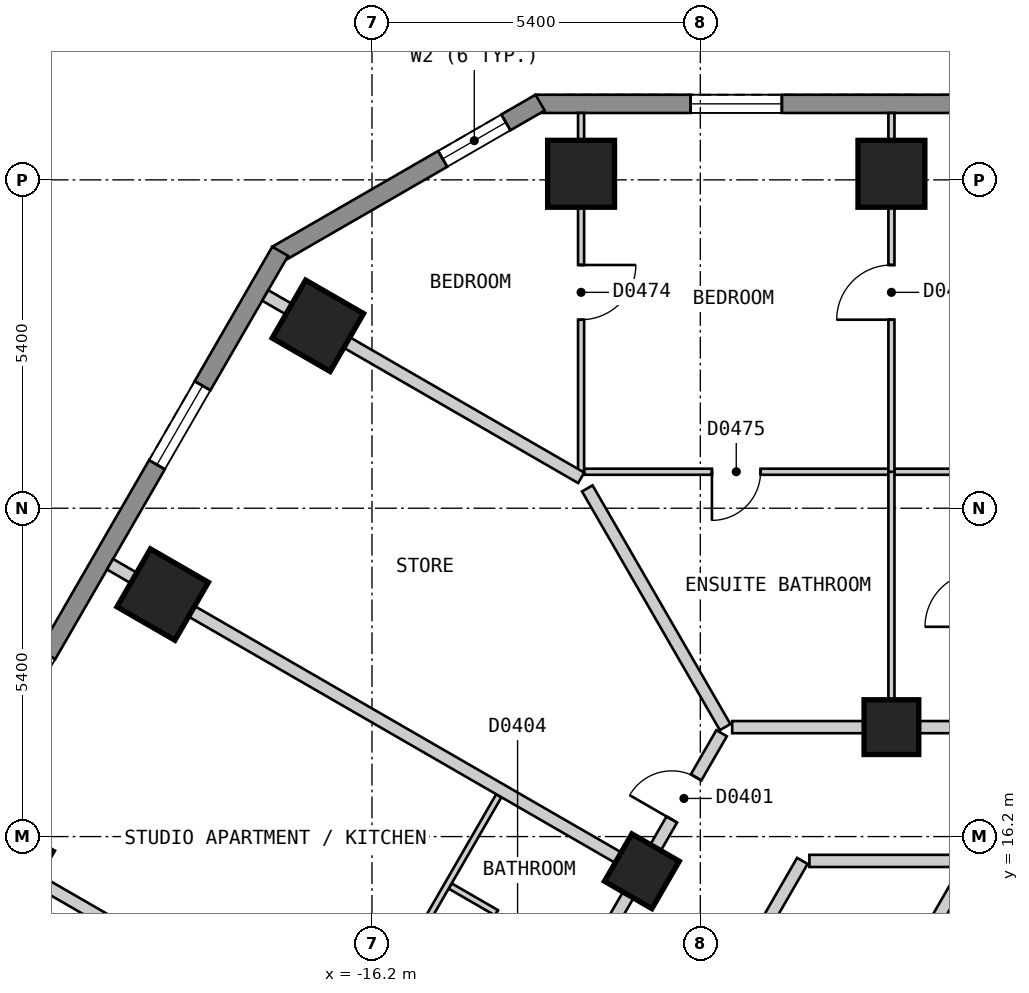
"""IFC4 building model, lengths in metres.
Left out: names, types, materials, properties, quantities, classifications, styles, units other than length and angle.
Written with IfcOpenShell. Run it as: python <this file> out.ifc"""

import sys

from ifc_helpers import new_model, si_unit, direction, frame, frame_2d, origin, origin_2d, place, context, subcontext, project, spatial, polyline, rectangle, outline, extrude, element, fill, save


model = new_model("IFC4")
c1 = context("Model", 3, precision=1e-05, world=origin(), true_north=direction((0.0, 1.0)))
c2 = subcontext(c1, "Body", "Model", "MODEL_VIEW")
j1 = project(units=[si_unit("LENGTHUNIT", "METRE"), si_unit("PLANEANGLEUNIT", "RADIAN")], contexts=[c1])
p1 = place(None, origin())
s1 = spatial("IfcSite", under=j1, at=p1, CompositionType="ELEMENT")
p2 = place(p1, origin())
s2 = spatial("IfcBuilding", under=s1, at=p2, CompositionType="ELEMENT")
p3 = place(p2, frame((0.0, 0.0, 26.4)))
s3 = spatial("IfcBuildingStorey", under=s2, at=p3, CompositionType="ELEMENT", Elevation=26.4)
for number, where, z_axis, x_axis in (
    (1, (-7.657, 27.1, 0.0), (0.0, 0.0, 1.0), (-1.0, 0.0, 0.0)),
    (2, (-12.761, 27.1, 0.0), (0.0, 0.0, 1.0), (-1.0, 0.0, 0.0)),
    (3, (-17.09, 24.6, 0.0), (0.0, 0.0, 1.0), (-0.5, -0.866, 0.0)),
    (4, (-19.642, 20.18, 0.0), (0.0, 0.0, 1.0), (-0.5, -0.866, 0.0)),
    (5, (-22.194, 15.759, 0.0), (0.0, 0.0, 1.0), (-0.5, -0.866, 0.0)),
):
    element("IfcColumn", number, at=place(p3, frame(where, z_axis=z_axis, x_axis=x_axis)), inside=s3, PredefinedType="COLUMN", context=c2, shape_type="SweptSolid", body=[
        extrude(rectangle(XDim=1.1, YDim=1.1, at=origin_2d()), origin(), (0.0, 0.0, 1.0), 3.0),
    ])
for number, where, z_axis, x_axis in (
    (6, (-7.657, 18.0, 0.0), (0.0, 0.0, 1.0), (-1.0, 0.0, 0.0)),
    (7, (-11.761, 15.63, 0.0), (0.0, 0.0, 1.0), (-0.5, -0.866, 0.0)),
):
    element("IfcColumn", number, at=place(p3, frame(where, z_axis=z_axis, x_axis=x_axis)), inside=s3, PredefinedType="COLUMN", context=c2, shape_type="SweptSolid", body=[
        extrude(rectangle(XDim=0.9, YDim=0.9, at=origin_2d()), origin(), (0.0, 0.0, 1.0), 3.0),
    ])
p4 = place(p3, frame((13.51, 28.25, 0.0), z_axis=(0.0, 0.0, 1.0), x_axis=(-1.0, 0.0, 0.0)))
e8 = element("IfcWall", 8, at=p4, inside=s3, PredefinedType="SOLIDWALL", context=c2, shape_type="SweptSolid", body=[
    extrude(outline(polyline([(0.0, -0.15), (27.02, -0.15), (26.94, 0.15), (0.08, 0.15), (0.0, -0.15)])), origin(), (0.0, 0.0, 1.0), 2.7),
])
p5 = place(p4, frame((2.553, 0.0, 0.15)))
e9 = element("IfcOpeningElement", 9, at=p5, cuts=e8, PredefinedType="OPENING", context=c2, shape_type="SweptSolid", body=[
    extrude(rectangle(XDim=1.5, YDim=2.1, at=frame_2d((0.75, 1.05))), frame((0.0, 0.16, 0.0), z_axis=(0.0, -1.0, 0.0), x_axis=(1.0, 0.0, 0.0)), (0.0, 0.0, 1.0), 0.32),
])
p6 = place(p4, frame((7.657, 0.0, 0.15)))
e10 = element("IfcOpeningElement", 10, at=p6, cuts=e8, PredefinedType="OPENING", context=c2, shape_type="SweptSolid", body=[
    extrude(rectangle(XDim=1.5, YDim=2.1, at=frame_2d((0.75, 1.05))), frame((0.0, 0.16, 0.0), z_axis=(0.0, -1.0, 0.0), x_axis=(1.0, 0.0, 0.0)), (0.0, 0.0, 1.0), 0.32),
])
p7 = place(p4, frame((12.761, 0.0, 0.15)))
e11 = element("IfcOpeningElement", 11, at=p7, cuts=e8, PredefinedType="OPENING", context=c2, shape_type="SweptSolid", body=[
    extrude(rectangle(XDim=1.5, YDim=2.1, at=frame_2d((0.75, 1.05))), frame((0.0, 0.16, 0.0), z_axis=(0.0, -1.0, 0.0), x_axis=(1.0, 0.0, 0.0)), (0.0, 0.0, 1.0), 0.32),
])
p8 = place(p4, frame((17.865, 0.0, 0.15)))
e12 = element("IfcOpeningElement", 12, at=p8, cuts=e8, PredefinedType="OPENING", context=c2, shape_type="SweptSolid", body=[
    extrude(rectangle(XDim=1.5, YDim=2.1, at=frame_2d((0.75, 1.05))), frame((0.0, 0.16, 0.0), z_axis=(0.0, -1.0, 0.0), x_axis=(1.0, 0.0, 0.0)), (0.0, 0.0, 1.0), 0.32),
])
p9 = place(p4, frame((22.969, 0.0, 0.15)))
e13 = element("IfcOpeningElement", 13, at=p9, cuts=e8, PredefinedType="OPENING", context=c2, shape_type="SweptSolid", body=[
    extrude(rectangle(XDim=1.5, YDim=2.1, at=frame_2d((0.75, 1.05))), frame((0.0, 0.16, 0.0), z_axis=(0.0, -1.0, 0.0), x_axis=(1.0, 0.0, 0.0)), (0.0, 0.0, 1.0), 0.32),
])
p10 = place(p3, frame((-13.435, 28.27, 0.0), z_axis=(0.0, 0.0, 1.0), x_axis=(-0.866010750942, -0.50002537861, 0.0)))
e14 = element("IfcWall", 14, at=p10, inside=s3, PredefinedType="SOLIDWALL", context=c2, shape_type="SweptSolid", body=[
    extrude(outline(polyline([(0.0, -0.15), (5.0, -0.15), (4.919, 0.15), (0.08, 0.15), (0.0, -0.15)])), origin(), (0.0, 0.0, 1.0), 2.7),
])
p11 = place(p10, frame((0.65, 0.0, 0.15)))
e15 = element("IfcOpeningElement", 15, at=p11, cuts=e14, PredefinedType="OPENING", context=c2, shape_type="SweptSolid", body=[
    extrude(rectangle(XDim=1.2, YDim=2.1, at=frame_2d((0.6, 1.05))), frame((0.0, 0.16, 0.0), z_axis=(0.0, -1.0, 0.0), x_axis=(1.0, 0.0, 0.0)), (0.0, 0.0, 1.0), 0.32),
])
p12 = place(p3, frame((-17.71, 25.825, 0.0), z_axis=(0.0, 0.0, 1.0), x_axis=(-0.500001938803, -0.866024284413, 0.0)))
e16 = element("IfcWall", 16, at=p12, inside=s3, PredefinedType="SOLIDWALL", context=c2, shape_type="SweptSolid", body=[
    extrude(outline(polyline([(0.0, -0.15), (27.02, -0.15), (26.94, 0.15), (0.08, 0.15), (0.0, -0.15)])), origin(), (0.0, 0.0, 1.0), 2.7),
])
p13 = place(p12, frame((2.553, 0.0, 0.15)))
e17 = element("IfcOpeningElement", 17, at=p13, cuts=e16, PredefinedType="OPENING", context=c2, shape_type="SweptSolid", body=[
    extrude(rectangle(XDim=1.5, YDim=2.1, at=frame_2d((0.75, 1.05))), frame((0.0, 0.16, 0.0), z_axis=(0.0, -1.0, 0.0), x_axis=(1.0, 0.0, 0.0)), (0.0, 0.0, 1.0), 0.32),
])
p14 = place(p12, frame((7.658, 0.0, 0.15)))
e18 = element("IfcOpeningElement", 18, at=p14, cuts=e16, PredefinedType="OPENING", context=c2, shape_type="SweptSolid", body=[
    extrude(rectangle(XDim=1.5, YDim=2.1, at=frame_2d((0.75, 1.05))), frame((0.0, 0.16, 0.0), z_axis=(0.0, -1.0, 0.0), x_axis=(1.0, 0.0, 0.0)), (0.0, 0.0, 1.0), 0.32),
])
p15 = place(p12, frame((12.761, 0.0, 0.15)))
e19 = element("IfcOpeningElement", 19, at=p15, cuts=e16, PredefinedType="OPENING", context=c2, shape_type="SweptSolid", body=[
    extrude(rectangle(XDim=1.5, YDim=2.1, at=frame_2d((0.75, 1.05))), frame((0.0, 0.16, 0.0), z_axis=(0.0, -1.0, 0.0), x_axis=(1.0, 0.0, 0.0)), (0.0, 0.0, 1.0), 0.32),
])
p16 = place(p12, frame((17.865, 0.0, 0.15)))
e20 = element("IfcOpeningElement", 20, at=p16, cuts=e16, PredefinedType="OPENING", context=c2, shape_type="SweptSolid", body=[
    extrude(rectangle(XDim=1.5, YDim=2.1, at=frame_2d((0.75, 1.05))), frame((0.0, 0.16, 0.0), z_axis=(0.0, -1.0, 0.0), x_axis=(1.0, 0.0, 0.0)), (0.0, 0.0, 1.0), 0.32),
])
p17 = place(p12, frame((22.969, 0.0, 0.15)))
e21 = element("IfcOpeningElement", 21, at=p17, cuts=e16, PredefinedType="OPENING", context=c2, shape_type="SweptSolid", body=[
    extrude(rectangle(XDim=1.5, YDim=2.1, at=frame_2d((0.75, 1.05))), frame((0.0, 0.16, 0.0), z_axis=(0.0, -1.0, 0.0), x_axis=(1.0, 0.0, 0.0)), (0.0, 0.0, 1.0), 0.32),
])
p18 = place(p3, frame((-9.006, 15.8, 0.0), z_axis=(0.0, 0.0, 1.0), x_axis=(1.0, 0.0, 0.0)))
e22 = element("IfcWall", 22, at=p18, inside=s3, PredefinedType="PARTITIONING", context=c2, shape_type="SweptSolid", body=[
    extrude(rectangle(XDim=2.54, YDim=0.2, at=frame_2d((1.27, 0.0))), origin(), (0.0, 0.0, 1.0), 2.7),
])
p19 = place(p3, frame((-10.276, 18.0, 0.0), z_axis=(0.0, 0.0, 1.0), x_axis=(1.0, 0.0, 0.0)))
e23 = element("IfcWall", 23, at=p19, inside=s3, PredefinedType="PARTITIONING", context=c2, shape_type="SweptSolid", body=[
    extrude(rectangle(XDim=20.5, YDim=0.2, at=frame_2d((10.25, 0.0))), origin(), (0.0, 0.0, 1.0), 2.7),
])
p20 = place(p19, frame((19.265, 0.0, 0.0)))
e24 = element("IfcOpeningElement", 24, at=p20, cuts=e23, PredefinedType="OPENING", context=c2, shape_type="SweptSolid", body=[
    extrude(rectangle(XDim=1.0, YDim=2.1, at=frame_2d((0.5, 1.05))), frame((0.0, 0.11, 0.0), z_axis=(0.0, -1.0, 0.0), x_axis=(1.0, 0.0, 0.0)), (0.0, 0.0, 1.0), 0.22),
])
p21 = place(p19, frame((9.775, 0.0, 0.0)))
e25 = element("IfcOpeningElement", 25, at=p21, cuts=e23, PredefinedType="OPENING", context=c2, shape_type="SweptSolid", body=[
    extrude(rectangle(XDim=1.0, YDim=2.1, at=frame_2d((0.5, 1.05))), frame((0.0, 0.11, 0.0), z_axis=(0.0, -1.0, 0.0), x_axis=(1.0, 0.0, 0.0)), (0.0, 0.0, 1.0), 0.22),
])
p22 = place(p19, frame((4.671, 0.0, 0.0)))
e26 = element("IfcOpeningElement", 26, at=p22, cuts=e23, PredefinedType="OPENING", context=c2, shape_type="SweptSolid", body=[
    extrude(rectangle(XDim=1.0, YDim=2.1, at=frame_2d((0.5, 1.05))), frame((0.0, 0.11, 0.0), z_axis=(0.0, -1.0, 0.0), x_axis=(1.0, 0.0, 0.0)), (0.0, 0.0, 1.0), 0.22),
])
p23 = place(p3, frame((-10.854, 8.0, 0.0), z_axis=(0.0, 0.0, 1.0), x_axis=(0.499964141897, 0.86604610548, 0.0)))
e27 = element("IfcWall", 27, at=p23, inside=s3, PredefinedType="PARTITIONING", context=c2, shape_type="SweptSolid", body=[
    extrude(rectangle(XDim=9.007, YDim=0.2, at=frame_2d((4.503, 0.0))), origin(), (0.0, 0.0, 1.0), 2.7),
])
p24 = place(p3, frame((-18.244, -0.001, 0.0), z_axis=(0.0, 0.0, 1.0), x_axis=(0.499962999376, 0.866046765051, 0.0)))
e28 = element("IfcWall", 28, at=p24, inside=s3, PredefinedType="PARTITIONING", context=c2, shape_type="SweptSolid", body=[
    extrude(rectangle(XDim=18.245, YDim=0.2, at=frame_2d((9.123, 0.0))), origin(), (0.0, 0.0, 1.0), 2.7),
])
p25 = place(p24, frame((8.672, 0.0, 0.0)))
e29 = element("IfcOpeningElement", 29, at=p25, cuts=e28, PredefinedType="OPENING", context=c2, shape_type="SweptSolid", body=[
    extrude(rectangle(XDim=0.9, YDim=2.1, at=frame_2d((0.45, 1.05))), frame((0.0, 0.11, 0.0), z_axis=(0.0, -1.0, 0.0), x_axis=(1.0, 0.0, 0.0)), (0.0, 0.0, 1.0), 0.22),
])
p26 = place(p3, frame((-20.727, 0.099, 0.0), z_axis=(0.0, 0.0, 1.0), x_axis=(0.499993204491, 0.866029327138, 0.0)))
e30 = element("IfcWall", 30, at=p26, inside=s3, PredefinedType="PARTITIONING", context=c2, shape_type="SweptSolid", body=[
    extrude(rectangle(XDim=20.554, YDim=0.2, at=frame_2d((10.277, 0.0))), origin(), (0.0, 0.0, 1.0), 2.7),
])
p27 = place(p26, frame((18.916, 0.0, 0.0)))
e31 = element("IfcOpeningElement", 31, at=p27, cuts=e30, PredefinedType="OPENING", context=c2, shape_type="SweptSolid", body=[
    extrude(rectangle(XDim=0.8, YDim=2.1, at=frame_2d((0.4, 1.05))), frame((0.0, 0.11, 0.0), z_axis=(0.0, -1.0, 0.0), x_axis=(1.0, 0.0, 0.0)), (0.0, 0.0, 1.0), 0.22),
])
p28 = place(p26, frame((14.88, 0.0, 0.0)))
e32 = element("IfcOpeningElement", 32, at=p28, cuts=e30, PredefinedType="OPENING", context=c2, shape_type="SweptSolid", body=[
    extrude(rectangle(XDim=1.0, YDim=2.1, at=frame_2d((0.5, 1.05))), frame((0.0, 0.11, 0.0), z_axis=(0.0, -1.0, 0.0), x_axis=(1.0, 0.0, 0.0)), (0.0, 0.0, 1.0), 0.22),
])
p29 = place(p26, frame((9.776, 0.0, 0.0)))
e33 = element("IfcOpeningElement", 33, at=p29, cuts=e30, PredefinedType="OPENING", context=c2, shape_type="SweptSolid", body=[
    extrude(rectangle(XDim=1.0, YDim=2.1, at=frame_2d((0.5, 1.05))), frame((0.0, 0.11, 0.0), z_axis=(0.0, -1.0, 0.0), x_axis=(1.0, 0.0, 0.0)), (0.0, 0.0, 1.0), 0.22),
])
p30 = place(p26, frame((4.673, 0.0, 0.0)))
e34 = element("IfcOpeningElement", 34, at=p30, cuts=e30, PredefinedType="OPENING", context=c2, shape_type="SweptSolid", body=[
    extrude(rectangle(XDim=1.0, YDim=2.1, at=frame_2d((0.5, 1.05))), frame((0.0, 0.11, 0.0), z_axis=(0.0, -1.0, 0.0), x_axis=(1.0, 0.0, 0.0)), (0.0, 0.0, 1.0), 0.22),
])
p31 = place(p26, frame((0.838, 0.0, 0.0)))
e35 = element("IfcOpeningElement", 35, at=p31, cuts=e30, PredefinedType="OPENING", context=c2, shape_type="SweptSolid", body=[
    extrude(rectangle(XDim=0.8, YDim=2.1, at=frame_2d((0.4, 1.05))), frame((0.0, 0.11, 0.0), z_axis=(0.0, -1.0, 0.0), x_axis=(1.0, 0.0, 0.0)), (0.0, 0.0, 1.0), 0.22),
])
p32 = place(p3, frame((-14.914, 15.387, 0.0), z_axis=(0.0, 0.0, 1.0), x_axis=(0.865983051302, -0.500073349477, 0.0)))
e36 = element("IfcWall", 36, at=p32, inside=s3, PredefinedType="PARTITIONING", context=c2, shape_type="SweptSolid", body=[
    extrude(rectangle(XDim=2.509, YDim=0.1, at=frame_2d((1.255, 0.0))), origin(), (0.0, 0.0, 1.0), 2.7),
])
p33 = place(p32, frame((0.88, 0.0, 0.0)))
e37 = element("IfcOpeningElement", 37, at=p33, cuts=e36, PredefinedType="OPENING", context=c2, shape_type="SweptSolid", body=[
    extrude(rectangle(XDim=0.8, YDim=2.1, at=frame_2d((0.4, 1.05))), frame((0.0, 0.06, 0.0), z_axis=(0.0, -1.0, 0.0), x_axis=(1.0, 0.0, 0.0)), (0.0, 0.0, 1.0), 0.12),
])
p34 = place(p3, frame((-12.711, 22.2, 0.0), z_axis=(0.0, 0.0, 1.0), x_axis=(1.0, 0.0, 0.0)))
e38 = element("IfcWall", 38, at=p34, inside=s3, PredefinedType="PARTITIONING", context=c2, shape_type="SweptSolid", body=[
    extrude(rectangle(XDim=10.058, YDim=0.1, at=frame_2d((5.029, 0.0))), origin(), (0.0, 0.0, 1.0), 2.7),
])
p35 = place(p34, frame((7.156, 0.0, 0.0)))
e39 = element("IfcOpeningElement", 39, at=p35, cuts=e38, PredefinedType="OPENING", context=c2, shape_type="SweptSolid", body=[
    extrude(rectangle(XDim=0.9, YDim=2.1, at=frame_2d((0.45, 1.05))), frame((0.0, 0.06, 0.0), z_axis=(0.0, -1.0, 0.0), x_axis=(1.0, 0.0, 0.0)), (0.0, 0.0, 1.0), 0.12),
])
p36 = place(p34, frame((2.102, 0.0, 0.0)))
e40 = element("IfcOpeningElement", 40, at=p36, cuts=e38, PredefinedType="OPENING", context=c2, shape_type="SweptSolid", body=[
    extrude(rectangle(XDim=0.8, YDim=2.1, at=frame_2d((0.4, 1.05))), frame((0.0, 0.06, 0.0), z_axis=(0.0, -1.0, 0.0), x_axis=(1.0, 0.0, 0.0)), (0.0, 0.0, 1.0), 0.12),
])
p37 = place(p3, frame((-15.723, 14.087, 0.0), z_axis=(0.0, 0.0, 1.0), x_axis=(0.500204249835, 0.865907447969, 0.0)))
e41 = element("IfcWall", 41, at=p37, inside=s3, PredefinedType="PARTITIONING", context=c2, shape_type="SweptSolid", body=[
    extrude(rectangle(XDim=3.217, YDim=0.1, at=frame_2d((1.608, 0.0))), origin(), (0.0, 0.0, 1.0), 2.7),
])
p38 = place(p3, frame((-7.657, 18.1, 0.0), z_axis=(0.0, 0.0, 1.0), x_axis=(0.0, 1.0, 0.0)))
e42 = element("IfcWall", 42, at=p38, inside=s3, PredefinedType="PARTITIONING", context=c2, shape_type="SweptSolid", body=[
    extrude(rectangle(XDim=4.1, YDim=0.1, at=frame_2d((2.05, 0.0))), origin(), (0.0, 0.0, 1.0), 2.7),
])
p39 = place(p3, frame((-12.761, 22.2, 0.0), z_axis=(0.0, 0.0, 1.0), x_axis=(0.0, 1.0, 0.0)))
e43 = element("IfcWall", 43, at=p39, inside=s3, PredefinedType="PARTITIONING", context=c2, shape_type="SweptSolid", body=[
    extrude(rectangle(XDim=5.9, YDim=0.1, at=frame_2d((2.95, 0.0))), origin(), (0.0, 0.0, 1.0), 2.7),
])
p40 = place(p39, frame((2.5, 0.0, 0.0)))
e44 = element("IfcOpeningElement", 44, at=p40, cuts=e43, PredefinedType="OPENING", context=c2, shape_type="SweptSolid", body=[
    extrude(rectangle(XDim=0.9, YDim=2.1, at=frame_2d((0.45, 1.05))), frame((0.0, 0.06, 0.0), z_axis=(0.0, -1.0, 0.0), x_axis=(1.0, 0.0, 0.0)), (0.0, 0.0, 1.0), 0.12),
])
p41 = place(p3, frame((-12.659, 21.926, 0.0), z_axis=(0.0, 0.0, 1.0), x_axis=(0.500025458316, -0.86601070492, 0.0)))
e45 = element("IfcWall", 45, at=p41, inside=s3, PredefinedType="PARTITIONING", context=c2, shape_type="SweptSolid", body=[
    extrude(rectangle(XDim=4.533, YDim=0.2, at=frame_2d((2.267, 0.0))), origin(), (0.0, 0.0, 1.0), 2.7),
])
p42 = place(p3, frame((-20.508, 20.679, 0.0), z_axis=(0.0, 0.0, 1.0), x_axis=(0.866047370643, -0.499961950354, 0.0)))
e46 = element("IfcWall", 46, at=p42, inside=s3, PredefinedType="PARTITIONING", context=c2, shape_type="SweptSolid", body=[
    extrude(rectangle(XDim=10.001, YDim=0.2, at=frame_2d((5.0, 0.0))), origin(), (0.0, 0.0, 1.0), 2.7),
])
p43 = place(p3, frame((-17.955, 25.099, 0.0), z_axis=(0.0, 0.0, 1.0), x_axis=(0.86609140076, -0.499885672459, 0.0)))
e47 = element("IfcWall", 47, at=p43, inside=s3, PredefinedType="PARTITIONING", context=c2, shape_type="SweptSolid", body=[
    extrude(rectangle(XDim=6.0, YDim=0.2, at=frame_2d((3.0, 0.0))), origin(), (0.0, 0.0, 1.0), 2.7),
])
p44 = place(p3, frame((-23.06, 16.259, 0.0), z_axis=(0.0, 0.0, 1.0), x_axis=(0.866047370643, -0.499961950354, 0.0)))
e48 = element("IfcWall", 48, at=p44, inside=s3, PredefinedType="PARTITIONING", context=c2, shape_type="SweptSolid", body=[
    extrude(rectangle(XDim=10.001, YDim=0.2, at=frame_2d((5.0, 0.0))), origin(), (0.0, 0.0, 1.0), 2.7),
])
p45 = place(p3, frame((-7.657, 22.2, 0.0), z_axis=(0.0, 0.0, 1.0), x_axis=(0.0, 1.0, 0.0)))
e49 = element("IfcWall", 49, at=p45, inside=s3, PredefinedType="PARTITIONING", context=c2, shape_type="SweptSolid", body=[
    extrude(rectangle(XDim=5.9, YDim=0.1, at=frame_2d((2.95, 0.0))), origin(), (0.0, 0.0, 1.0), 2.7),
])
p46 = place(p45, frame((2.5, 0.0, 0.0)))
e50 = element("IfcOpeningElement", 50, at=p46, cuts=e49, PredefinedType="OPENING", context=c2, shape_type="SweptSolid", body=[
    extrude(rectangle(XDim=0.9, YDim=2.1, at=frame_2d((0.45, 1.05))), frame((0.0, 0.06, 0.0), z_axis=(0.0, -1.0, 0.0), x_axis=(1.0, 0.0, 0.0)), (0.0, 0.0, 1.0), 0.12),
])
p47 = place(p9, origin())
e51 = element("IfcWindow", 51, at=p47, inside=s3, PartitioningType="SINGLE_PANEL", PredefinedType="WINDOW", context=c2, shape_type="SweptSolid", body=[
    extrude(rectangle(XDim=1.5, YDim=2.1, at=frame_2d((0.75, 1.05))), frame((0.0, 0.03, 0.0), z_axis=(0.0, -1.0, 0.0), x_axis=(1.0, 0.0, 0.0)), (0.0, 0.0, 1.0), 0.06),
])
fill(e13, e51)
p48 = place(p11, origin())
e52 = element("IfcWindow", 52, at=p48, inside=s3, PartitioningType="SINGLE_PANEL", PredefinedType="WINDOW", context=c2, shape_type="SweptSolid", body=[
    extrude(rectangle(XDim=1.2, YDim=2.1, at=frame_2d((0.6, 1.05))), frame((0.0, 0.03, 0.0), z_axis=(0.0, -1.0, 0.0), x_axis=(1.0, 0.0, 0.0)), (0.0, 0.0, 1.0), 0.06),
])
fill(e15, e52)
p49 = place(p13, origin())
e53 = element("IfcWindow", 53, at=p49, inside=s3, PartitioningType="SINGLE_PANEL", PredefinedType="WINDOW", context=c2, shape_type="SweptSolid", body=[
    extrude(rectangle(XDim=1.5, YDim=2.1, at=frame_2d((0.75, 1.05))), frame((0.0, 0.03, 0.0), z_axis=(0.0, -1.0, 0.0), x_axis=(1.0, 0.0, 0.0)), (0.0, 0.0, 1.0), 0.06),
])
fill(e17, e53)
p50 = place(p27, origin())
e54 = element("IfcDoor", 54, at=p50, inside=s3, OperationType="SINGLE_SWING_LEFT", PredefinedType="DOOR", context=c2, shape_type="SweptSolid", body=[
    extrude(rectangle(XDim=0.8, YDim=2.1, at=frame_2d((0.4, 1.05))), frame((0.0, 0.025, 0.0), z_axis=(0.0, -1.0, 0.0), x_axis=(1.0, 0.0, 0.0)), (0.0, 0.0, 1.0), 0.05),
])
fill(e31, e54)
p51 = place(p33, origin())
e55 = element("IfcDoor", 55, at=p51, inside=s3, OperationType="SINGLE_SWING_RIGHT", PredefinedType="DOOR", context=c2, shape_type="SweptSolid", body=[
    extrude(rectangle(XDim=0.8, YDim=2.1, at=frame_2d((0.4, 1.05))), frame((0.0, 0.025, 0.0), z_axis=(0.0, -1.0, 0.0), x_axis=(1.0, 0.0, 0.0)), (0.0, 0.0, 1.0), 0.05),
])
fill(e37, e55)
p52 = place(p46, origin())
e56 = element("IfcDoor", 56, at=p52, inside=s3, OperationType="SINGLE_SWING_LEFT", PredefinedType="DOOR", context=c2, shape_type="SweptSolid", body=[
    extrude(rectangle(XDim=0.9, YDim=2.1, at=frame_2d((0.45, 1.05))), frame((0.0, 0.025, 0.0), z_axis=(0.0, -1.0, 0.0), x_axis=(1.0, 0.0, 0.0)), (0.0, 0.0, 1.0), 0.05),
])
fill(e50, e56)
p53 = place(p40, origin())
e57 = element("IfcDoor", 57, at=p53, inside=s3, OperationType="SINGLE_SWING_RIGHT", PredefinedType="DOOR", context=c2, shape_type="SweptSolid", body=[
    extrude(rectangle(XDim=0.9, YDim=2.1, at=frame_2d((0.45, 1.05))), frame((0.0, 0.025, 0.0), z_axis=(0.0, -1.0, 0.0), x_axis=(1.0, 0.0, 0.0)), (0.0, 0.0, 1.0), 0.05),
])
fill(e44, e57)
p54 = place(p36, origin())
e58 = element("IfcDoor", 58, at=p54, inside=s3, OperationType="SINGLE_SWING_LEFT", PredefinedType="DOOR", context=c2, shape_type="SweptSolid", body=[
    extrude(rectangle(XDim=0.8, YDim=2.1, at=frame_2d((0.4, 1.05))), frame((0.0, 0.025, 0.0), z_axis=(0.0, -1.0, 0.0), x_axis=(1.0, 0.0, 0.0)), (0.0, 0.0, 1.0), 0.05),
])
fill(e40, e58)
save(model, sys.argv[1])
